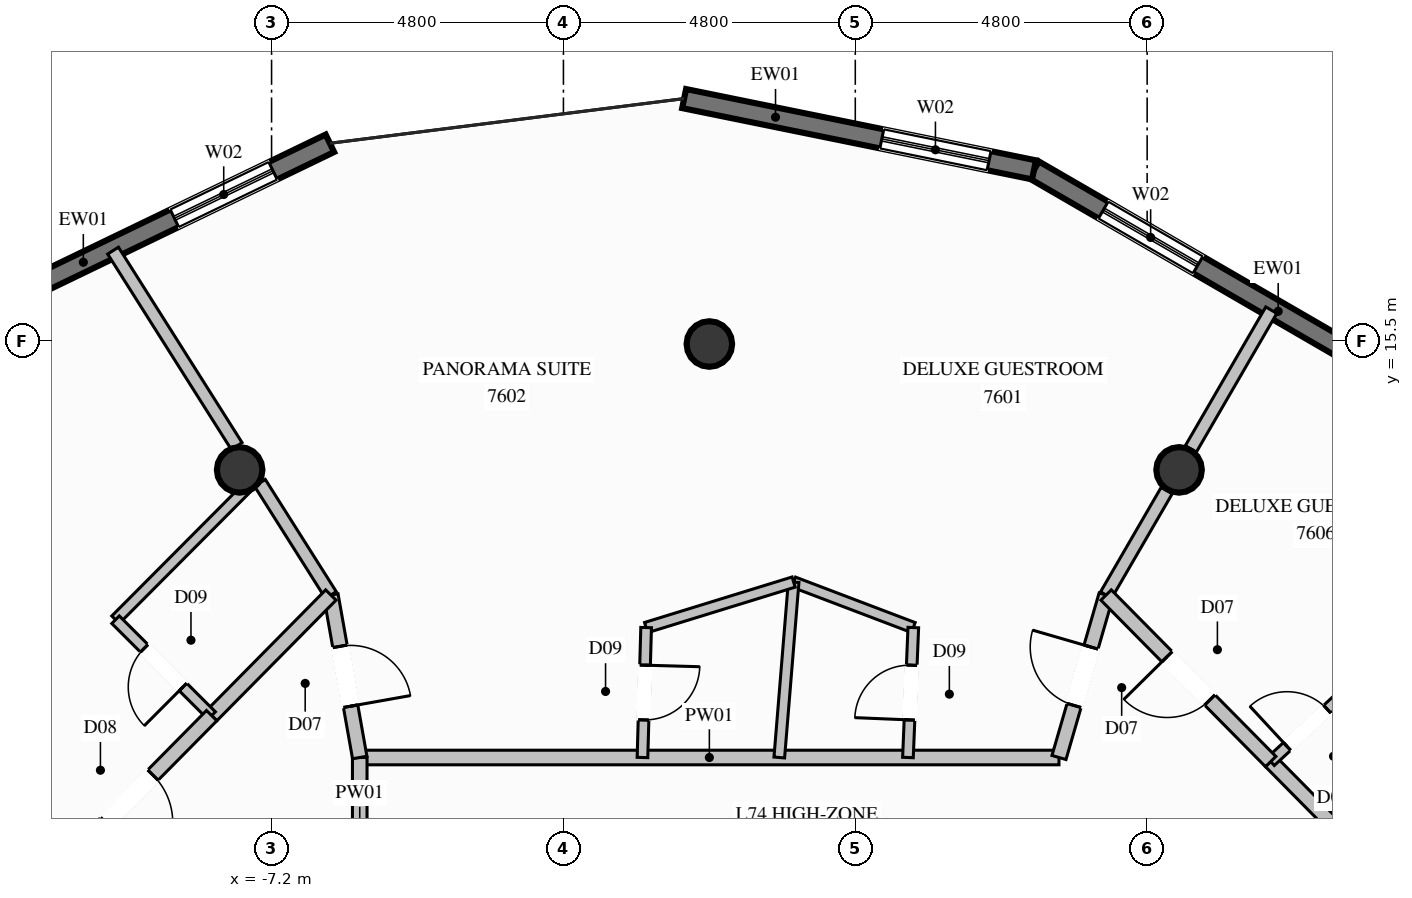
"""IFC4 building model, lengths in metres.
Left out: names, types, materials, properties, quantities, classifications, styles, units other than length and angle.
Written with IfcOpenShell. Run it as: python <this file> out.ifc"""

import sys

from ifc_helpers import new_model, si_unit, direction, frame, frame_2d, origin, origin_2d, place, context, subcontext, project, spatial, rectangle, circle, extrude, element, fill, save


model = new_model("IFC4")
c1 = context("Model", 3, precision=1e-05, world=origin(), true_north=direction((0.0, 1.0)))
c2 = subcontext(c1, "Body", "Model", "MODEL_VIEW")
j1 = project(units=[si_unit("LENGTHUNIT", "METRE"), si_unit("PLANEANGLEUNIT", "RADIAN")], contexts=[c1])
p1 = place(None, origin())
s1 = spatial("IfcSite", under=j1, at=p1, CompositionType="ELEMENT")
p2 = place(p1, origin())
s2 = spatial("IfcBuilding", under=s1, at=p2, CompositionType="ELEMENT")
p3 = place(p2, frame((0.0, 0.0, 285.8)))
s3 = spatial("IfcBuildingStorey", under=s2, at=p3, CompositionType="ELEMENT", Elevation=285.8)
for number, where, z_axis, x_axis in (
    (1, (7.725, 13.38, 0.0), (0.0, 0.0, 1.0), (1.0, 0.0, 0.0)),
    (2, (0.0, 15.45, 0.0), (0.0, 0.0, 1.0), (1.0, 0.0, 0.0)),
    (3, (-7.725, 13.38, 0.0), (0.0, 0.0, 1.0), (1.0, 0.0, 0.0)),
):
    element("IfcColumn", number, at=place(p3, frame(where, z_axis=z_axis, x_axis=x_axis)), inside=s3, PredefinedType="COLUMN", context=c2, shape_type="SweptSolid", body=[
        extrude(circle(Radius=0.375, at=origin_2d()), origin(), (0.0, 0.0, 1.0), 3.8),
    ])
p4 = place(p3, frame((5.339, 18.314, 0.0), z_axis=(0.0, 0.0, 1.0), x_axis=(0.865333025006, -0.501197322253, 0.0)))
e4 = element("IfcWall", 4, at=p4, inside=s3, PredefinedType="SOLIDWALL", context=c2, shape_type="SweptSolid", body=[
    extrude(rectangle(XDim=5.916, YDim=0.32, at=frame_2d((2.958, 0.0))), origin(), (0.0, 0.0, 1.0), 3.57),
])
p5 = place(p4, frame((1.317, 0.0, 0.35)))
e5 = element("IfcOpeningElement", 5, at=p5, cuts=e4, PredefinedType="OPENING", context=c2, shape_type="SweptSolid", body=[
    extrude(rectangle(XDim=1.8, YDim=2.6, at=frame_2d((0.9, 1.3))), frame((0.0, 0.17, 0.0), z_axis=(0.0, -1.0, 0.0), x_axis=(1.0, 0.0, 0.0)), (0.0, 0.0, 1.0), 0.34),
])
p6 = place(p3, frame((-0.415, 19.486, 0.0), z_axis=(0.0, 0.0, 1.0), x_axis=(0.97987730162, -0.199600785993, 0.0)))
e6 = element("IfcWall", 6, at=p6, inside=s3, PredefinedType="SOLIDWALL", context=c2, shape_type="SweptSolid", body=[
    extrude(rectangle(XDim=5.872, YDim=0.32, at=frame_2d((2.936, 0.0))), origin(), (0.0, 0.0, 1.0), 3.57),
])
p7 = place(p6, frame((3.318, 0.0, 0.35)))
e7 = element("IfcOpeningElement", 7, at=p7, cuts=e6, PredefinedType="OPENING", context=c2, shape_type="SweptSolid", body=[
    extrude(rectangle(XDim=1.8, YDim=2.6, at=frame_2d((0.9, 1.3))), frame((0.0, 0.17, 0.0), z_axis=(0.0, -1.0, 0.0), x_axis=(1.0, 0.0, 0.0)), (0.0, 0.0, 1.0), 0.34),
])
p8 = place(p3, frame((-11.569, 16.18, 0.0), z_axis=(0.0, 0.0, 1.0), x_axis=(0.900627949964, 0.434590952212, 0.0)))
e8 = element("IfcWall", 8, at=p8, inside=s3, PredefinedType="SOLIDWALL", context=c2, shape_type="SweptSolid", body=[
    extrude(rectangle(XDim=5.916, YDim=0.32, at=frame_2d((2.958, 0.0))), origin(), (0.0, 0.0, 1.0), 3.57),
])
p9 = place(p8, frame((3.077, 0.0, 0.35)))
e9 = element("IfcOpeningElement", 9, at=p9, cuts=e8, PredefinedType="OPENING", context=c2, shape_type="SweptSolid", body=[
    extrude(rectangle(XDim=1.8, YDim=2.6, at=frame_2d((0.9, 1.3))), frame((0.0, 0.17, 0.0), z_axis=(0.0, -1.0, 0.0), x_axis=(1.0, 0.0, 0.0)), (0.0, 0.0, 1.0), 0.34),
])
p10 = place(p3, frame((-5.75, 8.65, 0.0), z_axis=(0.0, 0.0, 1.0), x_axis=(1.0, 0.0, 0.0)))
e10 = element("IfcWall", 10, at=p10, inside=s3, PredefinedType="PARTITIONING", context=c2, shape_type="SweptSolid", body=[
    extrude(rectangle(XDim=11.5, YDim=0.24, at=frame_2d((5.75, 0.0))), origin(), (0.0, 0.0, 1.0), 3.57),
])
p11 = place(p3, frame((-5.75, 6.1, 0.0), z_axis=(0.0, 0.0, 1.0), x_axis=(0.0, 1.0, 0.0)))
e11 = element("IfcWall", 11, at=p11, inside=s3, PredefinedType="PARTITIONING", context=c2, shape_type="SweptSolid", body=[
    extrude(rectangle(XDim=2.55, YDim=0.24, at=frame_2d((1.275, 0.0))), origin(), (0.0, 0.0, 1.0), 3.57),
])
p12 = place(p3, frame((6.525, 11.322, 0.0), z_axis=(0.0, 0.0, 1.0), x_axis=(0.501738314133, 0.865019458817, 0.0)))
e12 = element("IfcWall", 12, at=p12, inside=s3, PredefinedType="PARTITIONING", context=c2, shape_type="SweptSolid", body=[
    extrude(rectangle(XDim=1.987, YDim=0.21, at=frame_2d((0.994, 0.0))), origin(), (0.0, 0.0, 1.0), 3.011),
])
p13 = place(p3, frame((7.918, 13.724, 0.0), z_axis=(0.0, 0.0, 1.0), x_axis=(0.501677940029, 0.865054474868, 0.0)))
e13 = element("IfcWall", 13, at=p13, inside=s3, PredefinedType="PARTITIONING", context=c2, shape_type="SweptSolid", body=[
    extrude(rectangle(XDim=2.639, YDim=0.21, at=frame_2d((1.32, 0.0))), origin(), (0.0, 0.0, 1.0), 3.57),
])
p14 = place(p3, frame((-6.225, 11.322, 0.0), z_axis=(0.0, 0.0, 1.0), x_axis=(-0.534565103323, 0.845127298287, 0.0)))
e14 = element("IfcWall", 14, at=p14, inside=s3, PredefinedType="PARTITIONING", context=c2, shape_type="SweptSolid", body=[
    extrude(rectangle(XDim=2.183, YDim=0.21, at=frame_2d((1.092, 0.0))), origin(), (0.0, 0.0, 1.0), 3.011),
])
p15 = place(p3, frame((-7.774, 13.772, 0.0), z_axis=(0.0, 0.0, 1.0), x_axis=(-0.534555632153, 0.845133288975, 0.0)))
e15 = element("IfcWall", 15, at=p15, inside=s3, PredefinedType="PARTITIONING", context=c2, shape_type="SweptSolid", body=[
    extrude(rectangle(XDim=3.803, YDim=0.21, at=frame_2d((1.901, 0.0))), origin(), (0.0, 0.0, 1.0), 3.57),
])
p16 = place(p3, frame((1.386, 11.535, 0.0), z_axis=(0.0, 0.0, 1.0), x_axis=(0.934790511534, -0.355199520758, 0.0)))
e16 = element("IfcWall", 16, at=p16, inside=s3, PredefinedType="PLUMBINGWALL", context=c2, shape_type="SweptSolid", body=[
    extrude(rectangle(XDim=2.105, YDim=0.175, at=frame_2d((1.053, 0.0))), origin(), (0.0, 0.0, 1.0), 3.57),
])
p17 = place(p3, frame((1.386, 11.535, 0.0), z_axis=(0.0, 0.0, 1.0), x_axis=(-0.081558642855, -0.99666854459, 0.0)))
e17 = element("IfcWall", 17, at=p17, inside=s3, PredefinedType="PLUMBINGWALL", context=c2, shape_type="SweptSolid", body=[
    extrude(rectangle(XDim=2.895, YDim=0.175, at=frame_2d((1.447, 0.0))), origin(), (0.0, 0.0, 1.0), 3.57),
])
p18 = place(p3, frame((3.266, 8.65, 0.0), z_axis=(0.0, 0.0, 1.0), x_axis=(0.04108932736, 0.999155476979, 0.0)))
e18 = element("IfcWall", 18, at=p18, inside=s3, PredefinedType="PLUMBINGWALL", context=c2, shape_type="SweptSolid", body=[
    extrude(rectangle(XDim=2.139, YDim=0.175, at=frame_2d((1.069, 0.0))), origin(), (0.0, 0.0, 1.0), 3.57),
])
p19 = place(p18, frame((0.619, 0.0, 0.0)))
e19 = element("IfcOpeningElement", 19, at=p19, cuts=e18, PredefinedType="OPENING", context=c2, shape_type="SweptSolid", body=[
    extrude(rectangle(XDim=0.9, YDim=2.1, at=frame_2d((0.45, 1.05))), frame((0.0, 0.098, 0.0), z_axis=(0.0, -1.0, 0.0), x_axis=(1.0, 0.0, 0.0)), (0.0, 0.0, 1.0), 0.195),
])
p20 = place(p3, frame((5.75, 8.65, 0.0), z_axis=(0.0, 0.0, 1.0), x_axis=(0.27852040308, 0.960430312448, 0.0)))
e20 = element("IfcWall", 20, at=p20, inside=s3, PredefinedType="PARTITIONING", context=c2, shape_type="SweptSolid", body=[
    extrude(rectangle(XDim=2.782, YDim=0.24, at=frame_2d((1.391, 0.0))), origin(), (0.0, 0.0, 1.0), 3.57),
])
p21 = place(p20, frame((0.891, 0.0, 0.0)))
e21 = element("IfcOpeningElement", 21, at=p21, cuts=e20, PredefinedType="OPENING", context=c2, shape_type="SweptSolid", body=[
    extrude(rectangle(XDim=1.0, YDim=2.2, at=frame_2d((0.5, 1.1))), frame((0.0, 0.13, 0.0), z_axis=(0.0, -1.0, 0.0), x_axis=(1.0, 0.0, 0.0)), (0.0, 0.0, 1.0), 0.26),
])
p22 = place(p3, frame((-1.04, 10.787, 0.0), z_axis=(0.0, 0.0, 1.0), x_axis=(0.955631255894, 0.294565617068, 0.0)))
e22 = element("IfcWall", 22, at=p22, inside=s3, PredefinedType="PLUMBINGWALL", context=c2, shape_type="SweptSolid", body=[
    extrude(rectangle(XDim=2.539, YDim=0.175, at=frame_2d((1.269, 0.0))), origin(), (0.0, 0.0, 1.0), 3.57),
])
p23 = place(p3, frame((-1.04, 10.787, 0.0), z_axis=(0.0, 0.0, 1.0), x_axis=(-0.028090350184, -0.999605388254, 0.0)))
e23 = element("IfcWall", 23, at=p23, inside=s3, PredefinedType="PLUMBINGWALL", context=c2, shape_type="SweptSolid", body=[
    extrude(rectangle(XDim=2.138, YDim=0.175, at=frame_2d((1.069, 0.0))), origin(), (0.0, 0.0, 1.0), 3.57),
])
p24 = place(p23, frame((0.619, 0.0, 0.0)))
e24 = element("IfcOpeningElement", 24, at=p24, cuts=e23, PredefinedType="OPENING", context=c2, shape_type="SweptSolid", body=[
    extrude(rectangle(XDim=0.9, YDim=2.1, at=frame_2d((0.45, 1.05))), frame((0.0, 0.098, 0.0), z_axis=(0.0, -1.0, 0.0), x_axis=(1.0, 0.0, 0.0)), (0.0, 0.0, 1.0), 0.195),
])
p25 = place(p3, frame((-6.225, 11.322, 0.0), z_axis=(0.0, 0.0, 1.0), x_axis=(0.175052712288, -0.984559062688, 0.0)))
e25 = element("IfcWall", 25, at=p25, inside=s3, PredefinedType="PARTITIONING", context=c2, shape_type="SweptSolid", body=[
    extrude(rectangle(XDim=2.714, YDim=0.24, at=frame_2d((1.357, 0.0))), origin(), (0.0, 0.0, 1.0), 3.57),
])
p26 = place(p25, frame((0.857, 0.0, 0.0)))
e26 = element("IfcOpeningElement", 26, at=p26, cuts=e25, PredefinedType="OPENING", context=c2, shape_type="SweptSolid", body=[
    extrude(rectangle(XDim=1.0, YDim=2.2, at=frame_2d((0.5, 1.1))), frame((0.0, 0.13, 0.0), z_axis=(0.0, -1.0, 0.0), x_axis=(1.0, 0.0, 0.0)), (0.0, 0.0, 1.0), 0.26),
])
p27 = place(p3, frame((-6.225, 11.322, 0.0), z_axis=(0.0, 0.0, 1.0), x_axis=(-0.702979205765, -0.711210402245, 0.0)))
e27 = element("IfcWall", 27, at=p27, inside=s3, PredefinedType="PARTITIONING", context=c2, shape_type="SweptSolid", body=[
    extrude(rectangle(XDim=2.788, YDim=0.24, at=frame_2d((1.394, 0.0))), origin(), (0.0, 0.0, 1.0), 3.57),
])
p28 = place(p3, frame((-7.443, 13.248, 0.0), z_axis=(0.0, 0.0, 1.0), x_axis=(-0.705733293668, -0.708477606003, 0.0)))
e28 = element("IfcWall", 28, at=p28, inside=s3, PredefinedType="PLUMBINGWALL", context=c2, shape_type="SweptSolid", body=[
    extrude(rectangle(XDim=3.292, YDim=0.175, at=frame_2d((1.646, 0.0))), origin(), (0.0, 0.0, 1.0), 3.137),
])
p29 = place(p3, frame((-8.185, 9.339, 0.0), z_axis=(0.0, 0.0, 1.0), x_axis=(-0.708035494418, 0.706176846579, 0.0)))
e29 = element("IfcWall", 29, at=p29, inside=s3, PredefinedType="PLUMBINGWALL", context=c2, shape_type="SweptSolid", body=[
    extrude(rectangle(XDim=2.233, YDim=0.175, at=frame_2d((1.116, 0.0))), origin(), (0.0, 0.0, 1.0), 3.57),
])
p30 = place(p29, frame((0.667, 0.0, 0.0)))
e30 = element("IfcOpeningElement", 30, at=p30, cuts=e29, PredefinedType="OPENING", context=c2, shape_type="SweptSolid", body=[
    extrude(rectangle(XDim=0.9, YDim=2.1, at=frame_2d((0.45, 1.05))), frame((0.0, 0.098, 0.0), z_axis=(0.0, -1.0, 0.0), x_axis=(1.0, 0.0, 0.0)), (0.0, 0.0, 1.0), 0.195),
])
p31 = place(p3, frame((-8.185, 9.339, 0.0), z_axis=(0.0, 0.0, 1.0), x_axis=(-0.702942107486, -0.711247069254, 0.0)))
e31 = element("IfcWall", 31, at=p31, inside=s3, PredefinedType="PARTITIONING", context=c2, shape_type="SweptSolid", body=[
    extrude(rectangle(XDim=3.851, YDim=0.24, at=frame_2d((1.926, 0.0))), origin(), (0.0, 0.0, 1.0), 3.57),
])
p32 = place(p31, frame((1.375, 0.0, 0.0)))
e32 = element("IfcOpeningElement", 32, at=p32, cuts=e31, PredefinedType="OPENING", context=c2, shape_type="SweptSolid", body=[
    extrude(rectangle(XDim=1.1, YDim=2.3, at=frame_2d((0.55, 1.15))), frame((0.0, 0.13, 0.0), z_axis=(0.0, -1.0, 0.0), x_axis=(1.0, 0.0, 0.0)), (0.0, 0.0, 1.0), 0.26),
])
p33 = place(p3, frame((11.192, 6.6, 0.0), z_axis=(0.0, 0.0, 1.0), x_axis=(-0.702979205765, 0.711210402245, 0.0)))
e33 = element("IfcWall", 33, at=p33, inside=s3, PredefinedType="PARTITIONING", context=c2, shape_type="SweptSolid", body=[
    extrude(rectangle(XDim=2.788, YDim=0.24, at=frame_2d((1.394, 0.0))), origin(), (0.0, 0.0, 1.0), 3.57),
])
p34 = place(p3, frame((9.232, 8.583, 0.0), z_axis=(0.0, 0.0, 1.0), x_axis=(0.733777226426, 0.679390154461, 0.0)))
e34 = element("IfcWall", 34, at=p34, inside=s3, PredefinedType="PLUMBINGWALL", context=c2, shape_type="SweptSolid", body=[
    extrude(rectangle(XDim=1.634, YDim=0.175, at=frame_2d((0.817, 0.0))), origin(), (0.0, 0.0, 1.0), 3.57),
])
p35 = place(p34, frame((0.367, 0.0, 0.0)))
e35 = element("IfcOpeningElement", 35, at=p35, cuts=e34, PredefinedType="OPENING", context=c2, shape_type="SweptSolid", body=[
    extrude(rectangle(XDim=0.9, YDim=2.1, at=frame_2d((0.45, 1.05))), frame((0.0, 0.098, 0.0), z_axis=(0.0, -1.0, 0.0), x_axis=(1.0, 0.0, 0.0)), (0.0, 0.0, 1.0), 0.195),
])
p36 = place(p3, frame((9.232, 8.583, 0.0), z_axis=(0.0, 0.0, 1.0), x_axis=(-0.702942107486, 0.711247069254, 0.0)))
e36 = element("IfcWall", 36, at=p36, inside=s3, PredefinedType="PARTITIONING", context=c2, shape_type="SweptSolid", body=[
    extrude(rectangle(XDim=3.851, YDim=0.24, at=frame_2d((1.926, 0.0))), origin(), (0.0, 0.0, 1.0), 3.57),
])
p37 = place(p36, frame((1.425, 0.0, 0.0)))
e37 = element("IfcOpeningElement", 37, at=p37, cuts=e36, PredefinedType="OPENING", context=c2, shape_type="SweptSolid", body=[
    extrude(rectangle(XDim=1.0, YDim=2.2, at=frame_2d((0.5, 1.1))), frame((0.0, 0.13, 0.0), z_axis=(0.0, -1.0, 0.0), x_axis=(1.0, 0.0, 0.0)), (0.0, 0.0, 1.0), 0.26),
])
p38 = place(p5, origin())
e38 = element("IfcWindow", 38, at=p38, inside=s3, PartitioningType="SINGLE_PANEL", PredefinedType="WINDOW", context=c2, shape_type="SweptSolid", body=[
    extrude(rectangle(XDim=1.8, YDim=2.6, at=frame_2d((0.9, 1.3))), frame((0.0, 0.03, 0.0), z_axis=(0.0, -1.0, 0.0), x_axis=(1.0, 0.0, 0.0)), (0.0, 0.0, 1.0), 0.06),
])
fill(e5, e38)
p39 = place(p7, origin())
e39 = element("IfcWindow", 39, at=p39, inside=s3, PartitioningType="SINGLE_PANEL", PredefinedType="WINDOW", context=c2, shape_type="SweptSolid", body=[
    extrude(rectangle(XDim=1.8, YDim=2.6, at=frame_2d((0.9, 1.3))), frame((0.0, 0.03, 0.0), z_axis=(0.0, -1.0, 0.0), x_axis=(1.0, 0.0, 0.0)), (0.0, 0.0, 1.0), 0.06),
])
fill(e7, e39)
p40 = place(p9, origin())
e40 = element("IfcWindow", 40, at=p40, inside=s3, PartitioningType="SINGLE_PANEL", PredefinedType="WINDOW", context=c2, shape_type="SweptSolid", body=[
    extrude(rectangle(XDim=1.8, YDim=2.6, at=frame_2d((0.9, 1.3))), frame((0.0, 0.03, 0.0), z_axis=(0.0, -1.0, 0.0), x_axis=(1.0, 0.0, 0.0)), (0.0, 0.0, 1.0), 0.06),
])
fill(e9, e40)
p41 = place(p19, origin())
e41 = element("IfcDoor", 41, at=p41, inside=s3, OperationType="SINGLE_SWING_LEFT", PredefinedType="DOOR", context=c2, shape_type="SweptSolid", body=[
    extrude(rectangle(XDim=0.9, YDim=2.1, at=frame_2d((0.45, 1.05))), frame((0.0, 0.025, 0.0), z_axis=(0.0, -1.0, 0.0), x_axis=(1.0, 0.0, 0.0)), (0.0, 0.0, 1.0), 0.05),
])
fill(e19, e41)
p42 = place(p21, origin())
e42 = element("IfcDoor", 42, at=p42, inside=s3, OperationType="SINGLE_SWING_RIGHT", PredefinedType="DOOR", context=c2, shape_type="SweptSolid", body=[
    extrude(rectangle(XDim=1.0, YDim=2.2, at=frame_2d((0.5, 1.1))), frame((0.0, 0.025, 0.0), z_axis=(0.0, -1.0, 0.0), x_axis=(1.0, 0.0, 0.0)), (0.0, 0.0, 1.0), 0.05),
])
fill(e21, e42)
p43 = place(p24, origin())
e43 = element("IfcDoor", 43, at=p43, inside=s3, OperationType="SINGLE_SWING_LEFT", PredefinedType="DOOR", context=c2, shape_type="SweptSolid", body=[
    extrude(rectangle(XDim=0.9, YDim=2.1, at=frame_2d((0.45, 1.05))), frame((0.0, 0.025, 0.0), z_axis=(0.0, -1.0, 0.0), x_axis=(1.0, 0.0, 0.0)), (0.0, 0.0, 1.0), 0.05),
])
fill(e24, e43)
p44 = place(p26, origin())
e44 = element("IfcDoor", 44, at=p44, inside=s3, OperationType="SINGLE_SWING_RIGHT", PredefinedType="DOOR", context=c2, shape_type="SweptSolid", body=[
    extrude(rectangle(XDim=1.0, YDim=2.2, at=frame_2d((0.5, 1.1))), frame((0.0, 0.025, 0.0), z_axis=(0.0, -1.0, 0.0), x_axis=(1.0, 0.0, 0.0)), (0.0, 0.0, 1.0), 0.05),
])
fill(e26, e44)
p45 = place(p30, origin())
e45 = element("IfcDoor", 45, at=p45, inside=s3, OperationType="SINGLE_SWING_LEFT", PredefinedType="DOOR", context=c2, shape_type="SweptSolid", body=[
    extrude(rectangle(XDim=0.9, YDim=2.1, at=frame_2d((0.45, 1.05))), frame((0.0, 0.025, 0.0), z_axis=(0.0, -1.0, 0.0), x_axis=(1.0, 0.0, 0.0)), (0.0, 0.0, 1.0), 0.05),
])
fill(e30, e45)
p46 = place(p32, origin())
e46 = element("IfcDoor", 46, at=p46, inside=s3, OperationType="SINGLE_SWING_RIGHT", PredefinedType="DOOR", context=c2, shape_type="SweptSolid", body=[
    extrude(rectangle(XDim=1.1, YDim=2.3, at=frame_2d((0.55, 1.15))), frame((0.0, 0.025, 0.0), z_axis=(0.0, -1.0, 0.0), x_axis=(1.0, 0.0, 0.0)), (0.0, 0.0, 1.0), 0.05),
])
fill(e32, e46)
p47 = place(p35, origin())
e47 = element("IfcDoor", 47, at=p47, inside=s3, OperationType="SINGLE_SWING_LEFT", PredefinedType="DOOR", context=c2, shape_type="SweptSolid", body=[
    extrude(rectangle(XDim=0.9, YDim=2.1, at=frame_2d((0.45, 1.05))), frame((0.0, 0.025, 0.0), z_axis=(0.0, -1.0, 0.0), x_axis=(1.0, 0.0, 0.0)), (0.0, 0.0, 1.0), 0.05),
])
fill(e35, e47)
p48 = place(p37, origin())
e48 = element("IfcDoor", 48, at=p48, inside=s3, OperationType="SINGLE_SWING_RIGHT", PredefinedType="DOOR", context=c2, shape_type="SweptSolid", body=[
    extrude(rectangle(XDim=1.0, YDim=2.2, at=frame_2d((0.5, 1.1))), frame((0.0, 0.025, 0.0), z_axis=(0.0, -1.0, 0.0), x_axis=(1.0, 0.0, 0.0)), (0.0, 0.0, 1.0), 0.05),
])
fill(e37, e48)
save(model, sys.argv[1])
